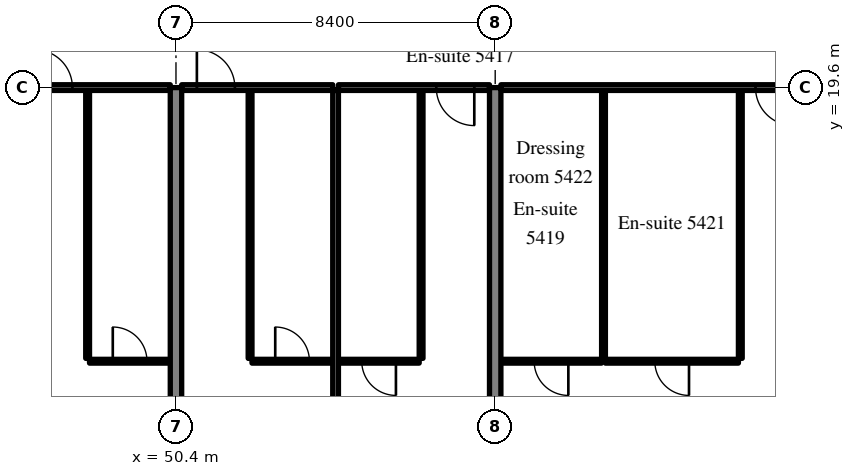
"""IFC4 building model, lengths in metres.
Left out: names, types, materials, properties, quantities, classifications, styles, units other than length and angle.
Written with IfcOpenShell. Run it as: python <this file> out.ifc"""

import sys

from ifc_helpers import new_model, si_unit, direction, frame, frame_2d, origin, place, context, subcontext, project, spatial, rectangle, extrude, source, transform, mapped, element, fill, save


model = new_model("IFC4")
c1 = context("Model", 3, precision=1e-05, world=origin(), true_north=direction((0.0, 1.0)))
c2 = subcontext(c1, "Body", "Model", "MODEL_VIEW")
j1 = project(units=[si_unit("LENGTHUNIT", "METRE"), si_unit("PLANEANGLEUNIT", "RADIAN")], contexts=[c1])
p1 = place(None, origin())
s1 = spatial("IfcSite", under=j1, at=p1, CompositionType="ELEMENT")
p2 = place(p1, origin())
s2 = spatial("IfcBuilding", under=s1, at=p2, CompositionType="ELEMENT")
p3 = place(p2, frame((0.0, 0.0, 225.7)))
s3 = spatial("IfcBuildingStorey", under=s2, at=p3, CompositionType="ELEMENT", Elevation=225.7)
m1 = source(origin(), c2, "Body", "SweptSolid", [
    extrude(rectangle(XDim=13.1, YDim=0.3, at=frame_2d((6.55, 0.0))), origin(), (0.0, 0.0, 1.0), 3.62),
])
p4 = place(p3, frame((50.4, 6.5, 0.0), z_axis=(0.0, 0.0, 1.0), x_axis=(0.0, 1.0, 0.0)))
e1 = element("IfcWall", 1, at=p4, inside=s3, PredefinedType="SHEAR", context=c2, shape_type="MappedRepresentation", body=[
    mapped(m1, transform((0.0, 0.0, 0.0), scale=1.0)),
])
m2 = source(origin(), c2, "Body", "SweptSolid", [
    extrude(rectangle(XDim=14.1, YDim=0.3, at=frame_2d((7.05, 0.0))), origin(), (0.0, 0.0, 1.0), 3.62),
])
p5 = place(p3, frame((58.8, 5.5, 0.0), z_axis=(0.0, 0.0, 1.0), x_axis=(0.0, 1.0, 0.0)))
e2 = element("IfcWall", 2, at=p5, inside=s3, PredefinedType="SHEAR", context=c2, shape_type="MappedRepresentation", body=[
    mapped(m2, transform((0.0, 0.0, 0.0), scale=1.0)),
])
m3 = source(origin(), c2, "Body", "SweptSolid", [
    extrude(rectangle(XDim=7.05, YDim=0.1, at=frame_2d((3.525, 0.0))), origin(), (0.0, 0.0, 1.0), 3.62),
])
p6 = place(p3, frame((48.075, 12.475, 0.0), z_axis=(0.0, 0.0, 1.0), x_axis=(0.0, 1.0, 0.0)))
e3 = element("IfcWall", 3, at=p6, inside=s3, PredefinedType="PARTITIONING", context=c2, shape_type="MappedRepresentation", body=[
    mapped(m3, transform((0.0, 0.0, 0.0), scale=1.0)),
])
m4 = source(origin(), c2, "Body", "SweptSolid", [
    extrude(rectangle(XDim=2.125, YDim=0.1, at=frame_2d((1.062, 0.0))), origin(), (0.0, 0.0, 1.0), 3.62),
])
p7 = place(p3, frame((48.125, 12.4, 0.0), z_axis=(0.0, 0.0, 1.0), x_axis=(1.0, 0.0, 0.0)))
e4 = element("IfcWall", 4, at=p7, inside=s3, PredefinedType="PARTITIONING", context=c2, shape_type="MappedRepresentation", body=[
    mapped(m4, transform((0.0, 0.0, 0.0), scale=1.0)),
])
m5 = source(origin(), c2, "Body", "SweptSolid", [
    extrude(rectangle(XDim=0.9, YDim=2.1, at=frame_2d((0.45, 1.05))), frame((0.0, 0.06, 0.0), z_axis=(0.0, -1.0, 0.0), x_axis=(1.0, 0.0, 0.0)), (0.0, 0.0, 1.0), 0.12),
])
p8 = place(p7, frame((0.612, 0.0, 0.0)))
e5 = element("IfcOpeningElement", 5, at=p8, cuts=e4, PredefinedType="OPENING", context=c2, shape_type="MappedRepresentation", body=[
    mapped(m5, transform((0.0, 0.0, 0.0), scale=1.0)),
])
m6 = source(origin(), c2, "Body", "SweptSolid", [
    extrude(rectangle(XDim=3.975, YDim=0.15, at=frame_2d((1.988, 0.0))), origin(), (0.0, 0.0, 1.0), 2.92),
])
p9 = place(p3, frame((46.275, 19.6, 0.0), z_axis=(0.0, 0.0, 1.0), x_axis=(1.0, 0.0, 0.0)))
e6 = element("IfcWall", 6, at=p9, inside=s3, PredefinedType="PARTITIONING", context=c2, shape_type="MappedRepresentation", body=[
    mapped(m6, transform((0.0, 0.0, 0.0), scale=1.0)),
])
m7 = source(origin(), c2, "Body", "SweptSolid", [
    extrude(rectangle(XDim=1.0, YDim=2.1, at=frame_2d((0.5, 1.05))), frame((0.0, 0.085, 0.0), z_axis=(0.0, -1.0, 0.0), x_axis=(1.0, 0.0, 0.0)), (0.0, 0.0, 1.0), 0.17),
])
p10 = place(p9, frame((0.4, 0.0, 0.0)))
e7 = element("IfcOpeningElement", 7, at=p10, cuts=e6, PredefinedType="OPENING", context=c2, shape_type="MappedRepresentation", body=[
    mapped(m7, transform((0.0, 0.0, 0.0), scale=1.0)),
])
p11 = place(p3, frame((52.35, 12.475, 0.0), z_axis=(0.0, 0.0, 1.0), x_axis=(0.0, 1.0, 0.0)))
e8 = element("IfcWall", 8, at=p11, inside=s3, PredefinedType="PARTITIONING", context=c2, shape_type="MappedRepresentation", body=[
    mapped(m3, transform((0.0, 0.0, 0.0), scale=1.0)),
])
p12 = place(p3, frame((52.4, 12.4, 0.0), z_axis=(0.0, 0.0, 1.0), x_axis=(1.0, 0.0, 0.0)))
e9 = element("IfcWall", 9, at=p12, inside=s3, PredefinedType="PARTITIONING", context=c2, shape_type="MappedRepresentation", body=[
    mapped(m4, transform((0.0, 0.0, 0.0), scale=1.0)),
])
p13 = place(p12, frame((0.612, 0.0, 0.0)))
e10 = element("IfcOpeningElement", 10, at=p13, cuts=e9, PredefinedType="OPENING", context=c2, shape_type="MappedRepresentation", body=[
    mapped(m5, transform((0.0, 0.0, 0.0), scale=1.0)),
])
m8 = source(origin(), c2, "Body", "SweptSolid", [
    extrude(rectangle(XDim=3.975, YDim=0.15, at=frame_2d((1.987, 0.0))), origin(), (0.0, 0.0, 1.0), 2.92),
])
p14 = place(p3, frame((50.55, 19.6, 0.0), z_axis=(0.0, 0.0, 1.0), x_axis=(1.0, 0.0, 0.0)))
e11 = element("IfcWall", 11, at=p14, inside=s3, PredefinedType="PARTITIONING", context=c2, shape_type="MappedRepresentation", body=[
    mapped(m8, transform((0.0, 0.0, 0.0), scale=1.0)),
])
p15 = place(p14, frame((0.4, 0.0, 0.0)))
e12 = element("IfcOpeningElement", 12, at=p15, cuts=e11, PredefinedType="OPENING", context=c2, shape_type="MappedRepresentation", body=[
    mapped(m7, transform((0.0, 0.0, 0.0), scale=1.0)),
])
p16 = place(p3, frame((56.85, 12.475, 0.0), z_axis=(0.0, 0.0, 1.0), x_axis=(0.0, 1.0, 0.0)))
e13 = element("IfcWall", 13, at=p16, inside=s3, PredefinedType="PARTITIONING", context=c2, shape_type="MappedRepresentation", body=[
    mapped(m3, transform((0.0, 0.0, 0.0), scale=1.0)),
])
p17 = place(p3, frame((54.675, 12.4, 0.0), z_axis=(0.0, 0.0, 1.0), x_axis=(1.0, 0.0, 0.0)))
e14 = element("IfcWall", 14, at=p17, inside=s3, PredefinedType="PARTITIONING", context=c2, shape_type="MappedRepresentation", body=[
    mapped(m4, transform((0.0, 0.0, 0.0), scale=1.0)),
])
p18 = place(p17, frame((0.613, 0.0, 0.0)))
e15 = element("IfcOpeningElement", 15, at=p18, cuts=e14, PredefinedType="OPENING", context=c2, shape_type="MappedRepresentation", body=[
    mapped(m5, transform((0.0, 0.0, 0.0), scale=1.0)),
])
p19 = place(p3, frame((54.675, 19.6, 0.0), z_axis=(0.0, 0.0, 1.0), x_axis=(1.0, 0.0, 0.0)))
e16 = element("IfcWall", 16, at=p19, inside=s3, PredefinedType="PARTITIONING", context=c2, shape_type="MappedRepresentation", body=[
    mapped(m8, transform((0.0, 0.0, 0.0), scale=1.0)),
])
p20 = place(p19, frame((2.575, 0.0, 0.0)))
e17 = element("IfcOpeningElement", 17, at=p20, cuts=e16, PredefinedType="OPENING", context=c2, shape_type="MappedRepresentation", body=[
    mapped(m7, transform((0.0, 0.0, 0.0), scale=1.0)),
])
m9 = source(origin(), c2, "Body", "SweptSolid", [
    extrude(rectangle(XDim=14.906, YDim=0.15, at=frame_2d((7.453, 0.0))), origin(), (0.0, 0.0, 1.0), 3.62),
])
p21 = place(p3, frame((54.6, 4.619, 0.0), z_axis=(0.0, 0.0, 1.0), x_axis=(0.0, 1.0, 0.0)))
e18 = element("IfcWall", 18, at=p21, inside=s3, PredefinedType="PARTITIONING", context=c2, shape_type="MappedRepresentation", body=[
    mapped(m9, transform((0.0, 0.0, 0.0), scale=1.0)),
])
for number, where, z_axis, x_axis in (
    (19, (65.25, 12.475, 0.0), (0.0, 0.0, 1.0), (0.0, 1.0, 0.0)),
    (20, (61.65, 12.475, 0.0), (0.0, 0.0, 1.0), (0.0, 1.0, 0.0)),
):
    element("IfcWall", number, at=place(p3, frame(where, z_axis=z_axis, x_axis=x_axis)), inside=s3, PredefinedType="PARTITIONING", context=c2, shape_type="MappedRepresentation", body=[
        mapped(m3, transform((0.0, 0.0, 0.0), scale=1.0)),
    ])
m10 = source(origin(), c2, "Body", "SweptSolid", [
    extrude(rectangle(XDim=3.5, YDim=0.1, at=frame_2d((1.75, 0.0))), origin(), (0.0, 0.0, 1.0), 3.62),
])
p22 = place(p3, frame((61.7, 12.4, 0.0), z_axis=(0.0, 0.0, 1.0), x_axis=(1.0, 0.0, 0.0)))
e21 = element("IfcWall", 21, at=p22, inside=s3, PredefinedType="PARTITIONING", context=c2, shape_type="MappedRepresentation", body=[
    mapped(m10, transform((0.0, 0.0, 0.0), scale=1.0)),
])
p23 = place(p22, frame((1.3, 0.0, 0.0)))
e22 = element("IfcOpeningElement", 22, at=p23, cuts=e21, PredefinedType="OPENING", context=c2, shape_type="MappedRepresentation", body=[
    mapped(m5, transform((0.0, 0.0, 0.0), scale=1.0)),
])
m11 = source(origin(), c2, "Body", "SweptSolid", [
    extrude(rectangle(XDim=2.65, YDim=0.1, at=frame_2d((1.325, 0.0))), origin(), (0.0, 0.0, 1.0), 3.62),
])
p24 = place(p3, frame((58.95, 12.4, 0.0), z_axis=(0.0, 0.0, 1.0), x_axis=(1.0, 0.0, 0.0)))
e23 = element("IfcWall", 23, at=p24, inside=s3, PredefinedType="PARTITIONING", context=c2, shape_type="MappedRepresentation", body=[
    mapped(m11, transform((0.0, 0.0, 0.0), scale=1.0)),
])
p25 = place(p24, frame((0.875, 0.0, 0.0)))
e24 = element("IfcOpeningElement", 24, at=p25, cuts=e23, PredefinedType="OPENING", context=c2, shape_type="MappedRepresentation", body=[
    mapped(m5, transform((0.0, 0.0, 0.0), scale=1.0)),
])
m12 = source(origin(), c2, "Body", "SweptSolid", [
    extrude(rectangle(XDim=8.1, YDim=0.15, at=frame_2d((4.05, 0.0))), origin(), (0.0, 0.0, 1.0), 2.92),
])
p26 = place(p3, frame((58.95, 19.6, 0.0), z_axis=(0.0, 0.0, 1.0), x_axis=(1.0, 0.0, 0.0)))
e25 = element("IfcWall", 25, at=p26, inside=s3, PredefinedType="PARTITIONING", context=c2, shape_type="MappedRepresentation", body=[
    mapped(m12, transform((0.0, 0.0, 0.0), scale=1.0)),
])
p27 = place(p26, frame((6.7, 0.0, 0.0)))
e26 = element("IfcOpeningElement", 26, at=p27, cuts=e25, PredefinedType="OPENING", context=c2, shape_type="MappedRepresentation", body=[
    mapped(m7, transform((0.0, 0.0, 0.0), scale=1.0)),
])
m13 = source(origin(), c2, "Body", "SweptSolid", [
    extrude(rectangle(XDim=0.9, YDim=2.1, at=frame_2d((0.45, 1.05))), frame((0.0, 0.025, 0.0), z_axis=(0.0, -1.0, 0.0), x_axis=(1.0, 0.0, 0.0)), (0.0, 0.0, 1.0), 0.05),
])
p28 = place(p8, origin())
e27 = element("IfcDoor", 27, at=p28, inside=s3, OperationType="SINGLE_SWING_LEFT", PredefinedType="DOOR", context=c2, shape_type="MappedRepresentation", body=[
    mapped(m13, transform((0.0, 0.0, 0.0), scale=1.0)),
])
fill(e5, e27)
m14 = source(origin(), c2, "Body", "SweptSolid", [
    extrude(rectangle(XDim=1.0, YDim=2.1, at=frame_2d((0.5, 1.05))), frame((0.0, 0.025, 0.0), z_axis=(0.0, -1.0, 0.0), x_axis=(1.0, 0.0, 0.0)), (0.0, 0.0, 1.0), 0.05),
])
p29 = place(p10, origin())
e28 = element("IfcDoor", 28, at=p29, inside=s3, OperationType="SINGLE_SWING_LEFT", PredefinedType="DOOR", context=c2, shape_type="MappedRepresentation", body=[
    mapped(m14, transform((0.0, 0.0, 0.0), scale=1.0)),
])
fill(e7, e28)
p30 = place(p13, origin())
e29 = element("IfcDoor", 29, at=p30, inside=s3, OperationType="SINGLE_SWING_LEFT", PredefinedType="DOOR", context=c2, shape_type="MappedRepresentation", body=[
    mapped(m13, transform((0.0, 0.0, 0.0), scale=1.0)),
])
fill(e10, e29)
p31 = place(p15, origin())
e30 = element("IfcDoor", 30, at=p31, inside=s3, OperationType="SINGLE_SWING_LEFT", PredefinedType="DOOR", context=c2, shape_type="MappedRepresentation", body=[
    mapped(m14, transform((0.0, 0.0, 0.0), scale=1.0)),
])
fill(e12, e30)
p32 = place(p18, origin())
e31 = element("IfcDoor", 31, at=p32, inside=s3, OperationType="SINGLE_SWING_RIGHT", PredefinedType="DOOR", context=c2, shape_type="MappedRepresentation", body=[
    mapped(m13, transform((0.0, 0.0, 0.0), scale=1.0)),
])
fill(e15, e31)
p33 = place(p20, origin())
e32 = element("IfcDoor", 32, at=p33, inside=s3, OperationType="SINGLE_SWING_RIGHT", PredefinedType="DOOR", context=c2, shape_type="MappedRepresentation", body=[
    mapped(m14, transform((0.0, 0.0, 0.0), scale=1.0)),
])
fill(e17, e32)
p34 = place(p23, origin())
e33 = element("IfcDoor", 33, at=p34, inside=s3, OperationType="SINGLE_SWING_RIGHT", PredefinedType="DOOR", context=c2, shape_type="MappedRepresentation", body=[
    mapped(m13, transform((0.0, 0.0, 0.0), scale=1.0)),
])
fill(e22, e33)
p35 = place(p25, origin())
e34 = element("IfcDoor", 34, at=p35, inside=s3, OperationType="SINGLE_SWING_RIGHT", PredefinedType="DOOR", context=c2, shape_type="MappedRepresentation", body=[
    mapped(m13, transform((0.0, 0.0, 0.0), scale=1.0)),
])
fill(e24, e34)
p36 = place(p27, origin())
e35 = element("IfcDoor", 35, at=p36, inside=s3, OperationType="SINGLE_SWING_RIGHT", PredefinedType="DOOR", context=c2, shape_type="MappedRepresentation", body=[
    mapped(m14, transform((0.0, 0.0, 0.0), scale=1.0)),
])
fill(e26, e35)
save(model, sys.argv[1])
